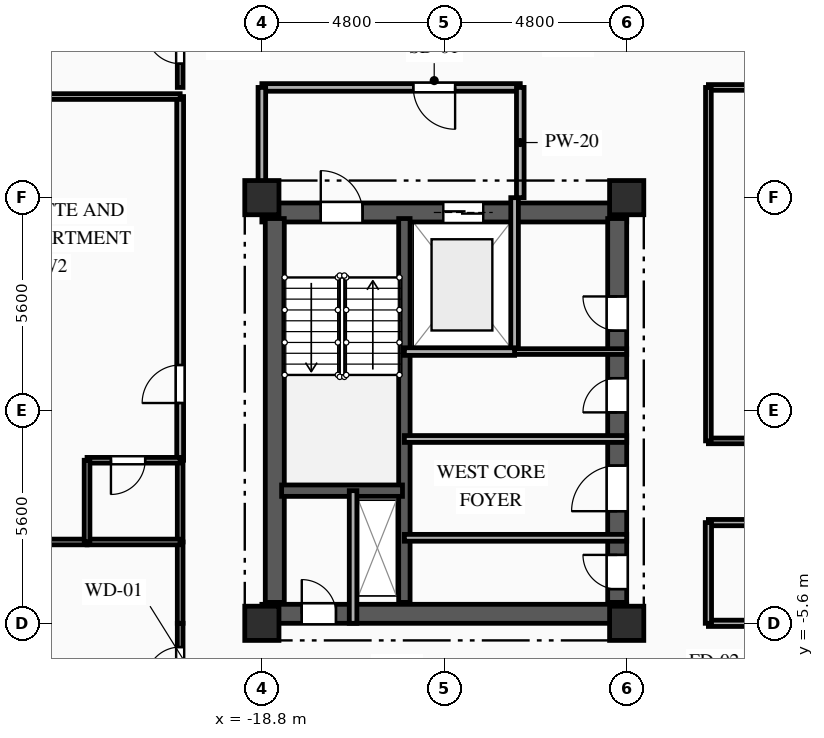
"""IFC4 building model, lengths in metres.
Left out: names, types, materials, properties, quantities, classifications, styles, units other than length and angle.
Written with IfcOpenShell. Run it as: python <this file> out.ifc"""

import sys

from ifc_helpers import new_model, si_unit, direction, frame, frame_2d, origin, origin_2d, place, context, subcontext, project, spatial, rectangle, extrude, element, fill, save


model = new_model("IFC4")
c1 = context("Model", 3, precision=1e-05, world=origin(), true_north=direction((0.0, 1.0)))
c2 = subcontext(c1, "Body", "Model", "MODEL_VIEW")
j1 = project(units=[si_unit("LENGTHUNIT", "METRE"), si_unit("PLANEANGLEUNIT", "RADIAN")], contexts=[c1])
p1 = place(None, origin())
s1 = spatial("IfcSite", under=j1, at=p1, CompositionType="ELEMENT")
p2 = place(p1, origin())
s2 = spatial("IfcBuilding", under=s1, at=p2, CompositionType="ELEMENT")
p3 = place(p2, frame((0.0, 0.0, 157.8)))
s3 = spatial("IfcBuildingStorey", under=s2, at=p3, CompositionType="ELEMENT", Elevation=157.8)
for number, where, z_axis, x_axis in (
    (1, (-18.8, -5.6, 0.0), (0.0, 0.0, 1.0), (1.0, 0.0, 0.0)),
    (2, (-18.8, 5.6, 0.0), (0.0, 0.0, 1.0), (1.0, 0.0, 0.0)),
    (3, (-9.2, -5.6, 0.0), (0.0, 0.0, 1.0), (1.0, 0.0, 0.0)),
    (4, (-9.2, 5.6, 0.0), (0.0, 0.0, 1.0), (1.0, 0.0, 0.0)),
):
    element("IfcColumn", number, at=place(p3, frame(where, z_axis=z_axis, x_axis=x_axis)), inside=s3, PredefinedType="COLUMN", context=c2, shape_type="SweptSolid", body=[
        extrude(rectangle(XDim=0.9, YDim=0.9, at=origin_2d()), origin(), (0.0, 0.0, 1.0), 3.35),
    ])
p4 = place(p3, frame((-18.8, 5.21, 0.0), z_axis=(0.0, 0.0, 1.0), x_axis=(1.0, 0.0, 0.0)))
e5 = element("IfcWall", 5, at=p4, inside=s3, PredefinedType="SHEAR", context=c2, shape_type="SweptSolid", body=[
    extrude(rectangle(XDim=9.6, YDim=0.5, at=frame_2d((4.8, 0.0))), origin(), (0.0, 0.0, 1.0), 3.04),
])
p5 = place(p4, frame((1.55, 0.0, 0.0)))
e6 = element("IfcOpeningElement", 6, at=p5, cuts=e5, PredefinedType="OPENING", context=c2, shape_type="SweptSolid", body=[
    extrude(rectangle(XDim=1.1, YDim=2.15, at=frame_2d((0.55, 1.075))), frame((0.0, 0.26, 0.0), z_axis=(0.0, -1.0, 0.0), x_axis=(1.0, 0.0, 0.0)), (0.0, 0.0, 1.0), 0.52),
])
p6 = place(p4, frame((4.775, 0.0, 0.0)))
e7 = element("IfcOpeningElement", 7, at=p6, cuts=e5, PredefinedType="OPENING", context=c2, shape_type="SweptSolid", body=[
    extrude(rectangle(XDim=1.05, YDim=2.1, at=frame_2d((0.525, 1.05))), frame((0.0, 0.26, 0.0), z_axis=(0.0, -1.0, 0.0), x_axis=(1.0, 0.0, 0.0)), (0.0, 0.0, 1.0), 0.52),
])
p7 = place(p3, frame((-18.8, -5.35, 0.0), z_axis=(0.0, 0.0, 1.0), x_axis=(1.0, 0.0, 0.0)))
e8 = element("IfcWall", 8, at=p7, inside=s3, PredefinedType="SHEAR", context=c2, shape_type="SweptSolid", body=[
    extrude(rectangle(XDim=9.6, YDim=0.5, at=frame_2d((4.8, 0.0))), origin(), (0.0, 0.0, 1.0), 3.04),
])
p8 = place(p7, frame((1.05, 0.0, 0.0)))
e9 = element("IfcOpeningElement", 9, at=p8, cuts=e8, PredefinedType="OPENING", context=c2, shape_type="SweptSolid", body=[
    extrude(rectangle(XDim=0.9, YDim=2.1, at=frame_2d((0.45, 1.05))), frame((0.0, 0.26, 0.0), z_axis=(0.0, -1.0, 0.0), x_axis=(1.0, 0.0, 0.0)), (0.0, 0.0, 1.0), 0.52),
])
p9 = place(p3, frame((-18.46, -5.05, 0.0), z_axis=(0.0, 0.0, 1.0), x_axis=(0.0, 1.0, 0.0)))
e10 = element("IfcWall", 10, at=p9, inside=s3, PredefinedType="SHEAR", context=c2, shape_type="SweptSolid", body=[
    extrude(rectangle(XDim=10.1, YDim=0.5, at=frame_2d((5.05, 0.0))), origin(), (0.0, 0.0, 1.0), 3.04),
])
p10 = place(p3, frame((-9.45, -5.05, 0.0), z_axis=(0.0, 0.0, 1.0), x_axis=(0.0, 1.0, 0.0)))
e11 = element("IfcWall", 11, at=p10, inside=s3, PredefinedType="SHEAR", context=c2, shape_type="SweptSolid", body=[
    extrude(rectangle(XDim=10.1, YDim=0.5, at=frame_2d((5.05, 0.0))), origin(), (0.0, 0.0, 1.0), 3.04),
])
p11 = place(p10, frame((7.15, 0.0, 0.0)))
e12 = element("IfcOpeningElement", 12, at=p11, cuts=e11, PredefinedType="OPENING", context=c2, shape_type="SweptSolid", body=[
    extrude(rectangle(XDim=0.9, YDim=2.1, at=frame_2d((0.45, 1.05))), frame((0.0, 0.26, 0.0), z_axis=(0.0, -1.0, 0.0), x_axis=(1.0, 0.0, 0.0)), (0.0, 0.0, 1.0), 0.52),
])
p12 = place(p10, frame((2.4, 0.0, 0.0)))
e13 = element("IfcOpeningElement", 13, at=p12, cuts=e11, PredefinedType="OPENING", context=c2, shape_type="SweptSolid", body=[
    extrude(rectangle(XDim=1.2, YDim=2.15, at=frame_2d((0.6, 1.075))), frame((0.0, 0.26, 0.0), z_axis=(0.0, -1.0, 0.0), x_axis=(1.0, 0.0, 0.0)), (0.0, 0.0, 1.0), 0.52),
])
p13 = place(p10, frame((0.35, 0.0, 0.0)))
e14 = element("IfcOpeningElement", 14, at=p13, cuts=e11, PredefinedType="OPENING", context=c2, shape_type="SweptSolid", body=[
    extrude(rectangle(XDim=0.9, YDim=2.1, at=frame_2d((0.45, 1.05))), frame((0.0, 0.26, 0.0), z_axis=(0.0, -1.0, 0.0), x_axis=(1.0, 0.0, 0.0)), (0.0, 0.0, 1.0), 0.52),
])
p14 = place(p10, frame((5.0, 0.0, 0.0)))
e15 = element("IfcOpeningElement", 15, at=p14, cuts=e11, PredefinedType="OPENING", context=c2, shape_type="SweptSolid", body=[
    extrude(rectangle(XDim=0.9, YDim=2.1, at=frame_2d((0.45, 1.05))), frame((0.0, 0.26, 0.0), z_axis=(0.0, -1.0, 0.0), x_axis=(1.0, 0.0, 0.0)), (0.0, 0.0, 1.0), 0.52),
])
p15 = place(p3, frame((-15.05, -5.05, 0.0), z_axis=(0.0, 0.0, 1.0), x_axis=(0.0, 1.0, 0.0)))
e16 = element("IfcWall", 16, at=p15, inside=s3, PredefinedType="SHEAR", context=c2, shape_type="SweptSolid", body=[
    extrude(rectangle(XDim=10.1, YDim=0.3, at=frame_2d((5.05, 0.0))), origin(), (0.0, 0.0, 1.0), 3.04),
])
p16 = place(p3, frame((-18.28, -2.11, 0.0), z_axis=(0.0, 0.0, 1.0), x_axis=(1.0, 0.0, 0.0)))
e17 = element("IfcWall", 17, at=p16, inside=s3, PredefinedType="SHEAR", context=c2, shape_type="SweptSolid", body=[
    extrude(rectangle(XDim=3.18, YDim=0.3, at=frame_2d((1.59, 0.0))), origin(), (0.0, 0.0, 1.0), 3.04),
])
p17 = place(p3, frame((-16.4, -5.6, 0.0), z_axis=(0.0, 0.0, 1.0), x_axis=(0.0, 1.0, 0.0)))
e18 = element("IfcWall", 18, at=p17, inside=s3, PredefinedType="PARTITIONING", context=c2, shape_type="SweptSolid", body=[
    extrude(rectangle(XDim=3.49, YDim=0.2, at=frame_2d((1.745, 0.0))), origin(), (0.0, 0.0, 1.0), 3.04),
])
p18 = place(p3, frame((-12.15, 1.55, 0.0), z_axis=(0.0, 0.0, 1.0), x_axis=(0.0, 1.0, 0.0)))
e19 = element("IfcWall", 19, at=p18, inside=s3, PredefinedType="PARTITIONING", context=c2, shape_type="SweptSolid", body=[
    extrude(rectangle(XDim=4.05, YDim=0.2, at=frame_2d((2.025, 0.0))), origin(), (0.0, 0.0, 1.0), 3.04),
])
p19 = place(p3, frame((-12.0, 8.5, 0.0), z_axis=(0.0, 0.0, 1.0), x_axis=(-1.0, 0.0, 0.0)))
e20 = element("IfcWall", 20, at=p19, inside=s3, PredefinedType="PARTITIONING", context=c2, shape_type="SweptSolid", body=[
    extrude(rectangle(XDim=6.8, YDim=0.2, at=frame_2d((3.4, 0.0))), origin(), (0.0, 0.0, 1.0), 3.04),
])
p20 = place(p19, frame((1.715, 0.0, 0.0)))
e21 = element("IfcOpeningElement", 21, at=p20, cuts=e20, PredefinedType="OPENING", context=c2, shape_type="SweptSolid", body=[
    extrude(rectangle(XDim=1.1, YDim=2.15, at=frame_2d((0.55, 1.075))), frame((0.0, 0.11, 0.0), z_axis=(0.0, -1.0, 0.0), x_axis=(1.0, 0.0, 0.0)), (0.0, 0.0, 1.0), 0.22),
])
p21 = place(p3, frame((-18.8, 8.5, 0.0), z_axis=(0.0, 0.0, 1.0), x_axis=(0.0, -1.0, 0.0)))
e22 = element("IfcWall", 22, at=p21, inside=s3, PredefinedType="PARTITIONING", context=c2, shape_type="SweptSolid", body=[
    extrude(rectangle(XDim=2.9, YDim=0.2, at=frame_2d((1.45, 0.0))), origin(), (0.0, 0.0, 1.0), 2.525),
])
p22 = place(p3, frame((-12.0, 5.6, 0.0), z_axis=(0.0, 0.0, 1.0), x_axis=(0.0, 1.0, 0.0)))
e23 = element("IfcWall", 23, at=p22, inside=s3, PredefinedType="PARTITIONING", context=c2, shape_type="SweptSolid", body=[
    extrude(rectangle(XDim=2.9, YDim=0.2, at=frame_2d((1.45, 0.0))), origin(), (0.0, 0.0, 1.0), 3.04),
])
p23 = place(p3, frame((-12.15, 1.55, 0.0), z_axis=(0.0, 0.0, 1.0), x_axis=(1.0, 0.0, 0.0)))
e24 = element("IfcWall", 24, at=p23, inside=s3, PredefinedType="PARTITIONING", context=c2, shape_type="SweptSolid", body=[
    extrude(rectangle(XDim=2.95, YDim=0.15, at=frame_2d((1.475, 0.0))), origin(), (0.0, 0.0, 1.0), 3.04),
])
p24 = place(p3, frame((-15.05, -3.35, 0.0), z_axis=(0.0, 0.0, 1.0), x_axis=(1.0, 0.0, 0.0)))
e25 = element("IfcWall", 25, at=p24, inside=s3, PredefinedType="PARTITIONING", context=c2, shape_type="SweptSolid", body=[
    extrude(rectangle(XDim=5.85, YDim=0.18, at=frame_2d((2.925, 0.0))), origin(), (0.0, 0.0, 1.0), 2.755),
])
p25 = place(p3, frame((-9.2, -0.75, 0.0), z_axis=(0.0, 0.0, 1.0), x_axis=(-1.0, 0.0, 0.0)))
e26 = element("IfcWall", 26, at=p25, inside=s3, PredefinedType="PARTITIONING", context=c2, shape_type="SweptSolid", body=[
    extrude(rectangle(XDim=5.85, YDim=0.18, at=frame_2d((2.925, 0.0))), origin(), (0.0, 0.0, 1.0), 3.04),
])
p26 = place(p3, frame((-20.95, 8.5, 0.0), z_axis=(0.0, 0.0, 1.0), x_axis=(0.0, 1.0, 0.0)))
e27 = element("IfcWall", 27, at=p26, inside=s3, PredefinedType="PARTITIONING", context=c2, shape_type="SweptSolid", body=[
    extrude(rectangle(XDim=2.15, YDim=0.15, at=frame_2d((1.075, 0.0))), origin(), (0.0, 0.0, 1.0), 3.04),
])
p27 = place(p26, frame((0.625, 0.0, 0.0)))
e28 = element("IfcOpeningElement", 28, at=p27, cuts=e27, PredefinedType="OPENING", context=c2, shape_type="SweptSolid", body=[
    extrude(rectangle(XDim=0.9, YDim=2.1, at=frame_2d((0.45, 1.05))), frame((0.0, 0.085, 0.0), z_axis=(0.0, -1.0, 0.0), x_axis=(1.0, 0.0, 0.0)), (0.0, 0.0, 1.0), 0.17),
])
p28 = place(p3, frame((0.0, 8.5, 0.0), z_axis=(0.0, 0.0, 1.0), x_axis=(-1.0, 0.0, 0.0)))
e29 = element("IfcWall", 29, at=p28, inside=s3, PredefinedType="PARTITIONING", context=c2, shape_type="SweptSolid", body=[
    extrude(rectangle(XDim=7.05, YDim=0.15, at=frame_2d((3.525, 0.0))), origin(), (0.0, 0.0, 1.0), 3.04),
])
p29 = place(p3, frame((-20.95, -7.75, 0.0), z_axis=(0.0, 0.0, 1.0), x_axis=(0.0, 1.0, 0.0)))
e30 = element("IfcWall", 30, at=p29, inside=s3, PredefinedType="PARTITIONING", context=c2, shape_type="SweptSolid", body=[
    extrude(rectangle(XDim=2.15, YDim=0.15, at=frame_2d((1.075, 0.0))), origin(), (0.0, 0.0, 1.0), 3.04),
])
p30 = place(p29, frame((0.625, 0.0, 0.0)))
e31 = element("IfcOpeningElement", 31, at=p30, cuts=e30, PredefinedType="OPENING", context=c2, shape_type="SweptSolid", body=[
    extrude(rectangle(XDim=0.9, YDim=2.1, at=frame_2d((0.45, 1.05))), frame((0.0, 0.085, 0.0), z_axis=(0.0, -1.0, 0.0), x_axis=(1.0, 0.0, 0.0)), (0.0, 0.0, 1.0), 0.17),
])
p31 = place(p3, frame((-7.05, -5.6, 0.0), z_axis=(0.0, 0.0, 1.0), x_axis=(1.0, 0.0, 0.0)))
e32 = element("IfcWall", 32, at=p31, inside=s3, PredefinedType="PARTITIONING", context=c2, shape_type="SweptSolid", body=[
    extrude(rectangle(XDim=7.05, YDim=0.165, at=frame_2d((3.525, 0.0))), origin(), (0.0, 0.0, 1.0), 2.525),
])
p32 = place(p3, frame((-20.95, -5.6, 0.0), z_axis=(0.0, 0.0, 1.0), x_axis=(0.0, 1.0, 0.0)))
e33 = element("IfcWall", 33, at=p32, inside=s3, PredefinedType="PARTITIONING", context=c2, shape_type="SweptSolid", body=[
    extrude(rectangle(XDim=2.14, YDim=0.15, at=frame_2d((1.07, 0.0))), origin(), (0.0, 0.0, 1.0), 3.04),
])
p33 = place(p3, frame((-20.95, -1.31, 0.0), z_axis=(0.0, 0.0, 1.0), x_axis=(0.0, 1.0, 0.0)))
e34 = element("IfcWall", 34, at=p33, inside=s3, PredefinedType="PARTITIONING", context=c2, shape_type="SweptSolid", body=[
    extrude(rectangle(XDim=9.57, YDim=0.18, at=frame_2d((4.785, 0.0))), origin(), (0.0, 0.0, 1.0), 3.04),
])
p34 = place(p33, frame((1.506, 0.0, 0.0)))
e35 = element("IfcOpeningElement", 35, at=p34, cuts=e34, PredefinedType="OPENING", context=c2, shape_type="SweptSolid", body=[
    extrude(rectangle(XDim=1.0, YDim=2.15, at=frame_2d((0.5, 1.075))), frame((0.0, 0.1, 0.0), z_axis=(0.0, -1.0, 0.0), x_axis=(1.0, 0.0, 0.0)), (0.0, 0.0, 1.0), 0.2),
])
p35 = place(p3, frame((-20.95, -3.46, 0.0), z_axis=(0.0, 0.0, 1.0), x_axis=(0.0, 1.0, 0.0)))
e36 = element("IfcWall", 36, at=p35, inside=s3, PredefinedType="PLUMBINGWALL", context=c2, shape_type="SweptSolid", body=[
    extrude(rectangle(XDim=2.15, YDim=0.15, at=frame_2d((1.075, 0.0))), origin(), (0.0, 0.0, 1.0), 3.04),
])
p36 = place(p3, frame((-7.05, -0.8, 0.0), z_axis=(0.0, 0.0, 1.0), x_axis=(1.0, 0.0, 0.0)))
e37 = element("IfcWall", 37, at=p36, inside=s3, PredefinedType="PARTITIONING", context=c2, shape_type="SweptSolid", body=[
    extrude(rectangle(XDim=14.1, YDim=0.15, at=frame_2d((7.05, 0.0))), origin(), (0.0, 0.0, 1.0), 3.04),
])
p37 = place(p36, frame((6.525, 0.0, 0.0)))
e38 = element("IfcOpeningElement", 38, at=p37, cuts=e37, PredefinedType="OPENING", context=c2, shape_type="SweptSolid", body=[
    extrude(rectangle(XDim=1.05, YDim=2.15, at=frame_2d((0.525, 1.075))), frame((0.0, 0.085, 0.0), z_axis=(0.0, -1.0, 0.0), x_axis=(1.0, 0.0, 0.0)), (0.0, 0.0, 1.0), 0.17),
])
p38 = place(p3, frame((7.05, -2.95, 0.0), z_axis=(0.0, 0.0, 1.0), x_axis=(-1.0, 0.0, 0.0)))
e39 = element("IfcWall", 39, at=p38, inside=s3, PredefinedType="PARTITIONING", context=c2, shape_type="SweptSolid", body=[
    extrude(rectangle(XDim=14.1, YDim=0.165, at=frame_2d((7.05, 0.0))), origin(), (0.0, 0.0, 1.0), 3.04),
])
p39 = place(p38, frame((6.475, 0.0, 0.0)))
e40 = element("IfcOpeningElement", 40, at=p39, cuts=e39, PredefinedType="OPENING", context=c2, shape_type="SweptSolid", body=[
    extrude(rectangle(XDim=1.15, YDim=2.15, at=frame_2d((0.575, 1.075))), frame((0.0, 0.093, 0.0), z_axis=(0.0, -1.0, 0.0), x_axis=(1.0, 0.0, 0.0)), (0.0, 0.0, 1.0), 0.185),
])
p40 = place(p3, frame((-7.05, 8.5, 0.0), z_axis=(0.0, 0.0, 1.0), x_axis=(0.0, -1.0, 0.0)))
e41 = element("IfcWall", 41, at=p40, inside=s3, PredefinedType="PARTITIONING", context=c2, shape_type="SweptSolid", body=[
    extrude(rectangle(XDim=9.3, YDim=0.15, at=frame_2d((4.65, 0.0))), origin(), (0.0, 0.0, 1.0), 3.04),
])
p41 = place(p3, frame((-7.05, -2.95, 0.0), z_axis=(0.0, 0.0, 1.0), x_axis=(0.0, -1.0, 0.0)))
e42 = element("IfcWall", 42, at=p41, inside=s3, PredefinedType="PARTITIONING", context=c2, shape_type="SweptSolid", body=[
    extrude(rectangle(XDim=2.65, YDim=0.165, at=frame_2d((1.325, 0.0))), origin(), (0.0, 0.0, 1.0), 3.04),
])
p42 = place(p3, frame((-24.765, -3.46, 0.0), z_axis=(0.0, 0.0, 1.0), x_axis=(1.0, 0.0, 0.0)))
e43 = element("IfcWall", 43, at=p42, inside=s3, PredefinedType="PARTITIONING", context=c2, shape_type="SweptSolid", body=[
    extrude(rectangle(XDim=1.365, YDim=0.15, at=frame_2d((0.683, 0.0))), origin(), (0.0, 0.0, 1.0), 3.04),
])
p43 = place(p3, frame((-23.4, -3.46, 0.0), z_axis=(0.0, 0.0, 1.0), x_axis=(1.0, 0.0, 0.0)))
e44 = element("IfcWall", 44, at=p43, inside=s3, PredefinedType="PLUMBINGWALL", context=c2, shape_type="SweptSolid", body=[
    extrude(rectangle(XDim=2.45, YDim=0.15, at=frame_2d((1.225, 0.0))), origin(), (0.0, 0.0, 1.0), 3.04),
])
p44 = place(p3, frame((-20.95, -1.31, 0.0), z_axis=(0.0, 0.0, 1.0), x_axis=(-1.0, 0.0, 0.0)))
e45 = element("IfcWall", 45, at=p44, inside=s3, PredefinedType="PLUMBINGWALL", context=c2, shape_type="SweptSolid", body=[
    extrude(rectangle(XDim=2.45, YDim=0.15, at=frame_2d((1.225, 0.0))), origin(), (0.0, 0.0, 1.0), 3.04),
])
p45 = place(p44, frame((0.921, 0.0, 0.0)))
e46 = element("IfcOpeningElement", 46, at=p45, cuts=e45, PredefinedType="OPENING", context=c2, shape_type="SweptSolid", body=[
    extrude(rectangle(XDim=0.9, YDim=2.1, at=frame_2d((0.45, 1.05))), frame((0.0, 0.085, 0.0), z_axis=(0.0, -1.0, 0.0), x_axis=(1.0, 0.0, 0.0)), (0.0, 0.0, 1.0), 0.17),
])
p46 = place(p3, frame((-23.4, -1.31, 0.0), z_axis=(0.0, 0.0, 1.0), x_axis=(0.0, -1.0, 0.0)))
e47 = element("IfcWall", 47, at=p46, inside=s3, PredefinedType="PLUMBINGWALL", context=c2, shape_type="SweptSolid", body=[
    extrude(rectangle(XDim=2.15, YDim=0.15, at=frame_2d((1.075, 0.0))), origin(), (0.0, 0.0, 1.0), 3.04),
])
p47 = place(p3, frame((-24.765, 8.26, 0.0), z_axis=(0.0, 0.0, 1.0), x_axis=(1.0, 0.0, 0.0)))
e48 = element("IfcWall", 48, at=p47, inside=s3, PredefinedType="PARTITIONING", context=c2, shape_type="SweptSolid", body=[
    extrude(rectangle(XDim=3.815, YDim=0.15, at=frame_2d((1.907, 0.0))), origin(), (0.0, 0.0, 1.0), 3.04),
])
p48 = place(p3, frame((-15.05, 1.55, 0.0), z_axis=(0.0, 0.0, 1.0), x_axis=(1.0, 0.0, 0.0)))
e49 = element("IfcWall", 49, at=p48, inside=s3, PredefinedType="PARTITIONING", context=c2, shape_type="SweptSolid", body=[
    extrude(rectangle(XDim=2.9, YDim=0.2, at=frame_2d((1.45, 0.0))), origin(), (0.0, 0.0, 1.0), 3.04),
])
p49 = place(p5, origin())
e50 = element("IfcDoor", 50, at=p49, inside=s3, OperationType="SINGLE_SWING_LEFT", PredefinedType="DOOR", context=c2, shape_type="SweptSolid", body=[
    extrude(rectangle(XDim=1.1, YDim=2.15, at=frame_2d((0.55, 1.075))), frame((0.0, 0.025, 0.0), z_axis=(0.0, -1.0, 0.0), x_axis=(1.0, 0.0, 0.0)), (0.0, 0.0, 1.0), 0.05),
])
fill(e6, e50)
p50 = place(p6, origin())
e51 = element("IfcDoor", 51, at=p50, inside=s3, OperationType="DOUBLE_DOOR_SLIDING", PredefinedType="DOOR", context=c2, shape_type="SweptSolid", body=[
    extrude(rectangle(XDim=1.05, YDim=2.1, at=frame_2d((0.525, 1.05))), frame((0.0, 0.025, 0.0), z_axis=(0.0, -1.0, 0.0), x_axis=(1.0, 0.0, 0.0)), (0.0, 0.0, 1.0), 0.05),
])
fill(e7, e51)
p51 = place(p8, origin())
e52 = element("IfcDoor", 52, at=p51, inside=s3, OperationType="SINGLE_SWING_LEFT", PredefinedType="DOOR", context=c2, shape_type="SweptSolid", body=[
    extrude(rectangle(XDim=0.9, YDim=2.1, at=frame_2d((0.45, 1.05))), frame((0.0, 0.025, 0.0), z_axis=(0.0, -1.0, 0.0), x_axis=(1.0, 0.0, 0.0)), (0.0, 0.0, 1.0), 0.05),
])
fill(e9, e52)
p52 = place(p20, origin())
e53 = element("IfcDoor", 53, at=p52, inside=s3, OperationType="SINGLE_SWING_LEFT", PredefinedType="DOOR", context=c2, shape_type="SweptSolid", body=[
    extrude(rectangle(XDim=1.1, YDim=2.15, at=frame_2d((0.55, 1.075))), frame((0.0, 0.025, 0.0), z_axis=(0.0, -1.0, 0.0), x_axis=(1.0, 0.0, 0.0)), (0.0, 0.0, 1.0), 0.05),
])
fill(e21, e53)
p53 = place(p11, origin())
e54 = element("IfcDoor", 54, at=p53, inside=s3, OperationType="SINGLE_SWING_RIGHT", PredefinedType="DOOR", context=c2, shape_type="SweptSolid", body=[
    extrude(rectangle(XDim=0.9, YDim=2.1, at=frame_2d((0.45, 1.05))), frame((0.0, 0.025, 0.0), z_axis=(0.0, -1.0, 0.0), x_axis=(1.0, 0.0, 0.0)), (0.0, 0.0, 1.0), 0.05),
])
fill(e12, e54)
p54 = place(p12, origin())
e55 = element("IfcDoor", 55, at=p54, inside=s3, OperationType="SINGLE_SWING_LEFT", PredefinedType="DOOR", context=c2, shape_type="SweptSolid", body=[
    extrude(rectangle(XDim=1.2, YDim=2.15, at=frame_2d((0.6, 1.075))), frame((0.0, 0.025, 0.0), z_axis=(0.0, -1.0, 0.0), x_axis=(1.0, 0.0, 0.0)), (0.0, 0.0, 1.0), 0.05),
])
fill(e13, e55)
p55 = place(p13, origin())
e56 = element("IfcDoor", 56, at=p55, inside=s3, OperationType="SINGLE_SWING_RIGHT", PredefinedType="DOOR", context=c2, shape_type="SweptSolid", body=[
    extrude(rectangle(XDim=0.9, YDim=2.1, at=frame_2d((0.45, 1.05))), frame((0.0, 0.025, 0.0), z_axis=(0.0, -1.0, 0.0), x_axis=(1.0, 0.0, 0.0)), (0.0, 0.0, 1.0), 0.05),
])
fill(e14, e56)
p56 = place(p14, origin())
e57 = element("IfcDoor", 57, at=p56, inside=s3, OperationType="SINGLE_SWING_LEFT", PredefinedType="DOOR", context=c2, shape_type="SweptSolid", body=[
    extrude(rectangle(XDim=0.9, YDim=2.1, at=frame_2d((0.45, 1.05))), frame((0.0, 0.025, 0.0), z_axis=(0.0, -1.0, 0.0), x_axis=(1.0, 0.0, 0.0)), (0.0, 0.0, 1.0), 0.05),
])
fill(e15, e57)
p57 = place(p27, origin())
e58 = element("IfcDoor", 58, at=p57, inside=s3, OperationType="SINGLE_SWING_RIGHT", PredefinedType="DOOR", context=c2, shape_type="SweptSolid", body=[
    extrude(rectangle(XDim=0.9, YDim=2.1, at=frame_2d((0.45, 1.05))), frame((0.0, 0.025, 0.0), z_axis=(0.0, -1.0, 0.0), x_axis=(1.0, 0.0, 0.0)), (0.0, 0.0, 1.0), 0.05),
])
fill(e28, e58)
p58 = place(p30, origin())
e59 = element("IfcDoor", 59, at=p58, inside=s3, OperationType="SINGLE_SWING_LEFT", PredefinedType="DOOR", context=c2, shape_type="SweptSolid", body=[
    extrude(rectangle(XDim=0.9, YDim=2.1, at=frame_2d((0.45, 1.05))), frame((0.0, 0.025, 0.0), z_axis=(0.0, -1.0, 0.0), x_axis=(1.0, 0.0, 0.0)), (0.0, 0.0, 1.0), 0.05),
])
fill(e31, e59)
p59 = place(p34, origin())
e60 = element("IfcDoor", 60, at=p59, inside=s3, OperationType="SINGLE_SWING_LEFT", PredefinedType="DOOR", context=c2, shape_type="SweptSolid", body=[
    extrude(rectangle(XDim=1.0, YDim=2.15, at=frame_2d((0.5, 1.075))), frame((0.0, 0.025, 0.0), z_axis=(0.0, -1.0, 0.0), x_axis=(1.0, 0.0, 0.0)), (0.0, 0.0, 1.0), 0.05),
])
fill(e35, e60)
p60 = place(p45, origin())
e61 = element("IfcDoor", 61, at=p60, inside=s3, OperationType="SINGLE_SWING_RIGHT", PredefinedType="DOOR", context=c2, shape_type="SweptSolid", body=[
    extrude(rectangle(XDim=0.9, YDim=2.1, at=frame_2d((0.45, 1.05))), frame((0.0, 0.025, 0.0), z_axis=(0.0, -1.0, 0.0), x_axis=(1.0, 0.0, 0.0)), (0.0, 0.0, 1.0), 0.05),
])
fill(e46, e61)
save(model, sys.argv[1])
